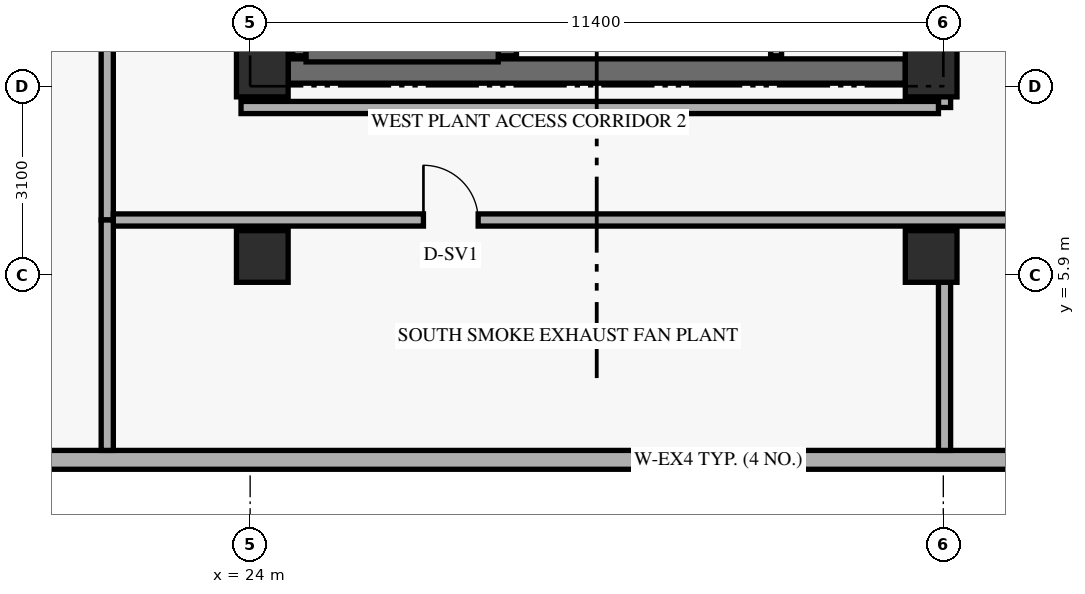
"""IFC4 building model, lengths in metres.
Left out: names, types, materials, properties, quantities, classifications, styles, units other than length and angle.
Written with IfcOpenShell. Run it as: python <this file> out.ifc"""

import sys

from ifc_helpers import new_model, si_unit, direction, frame, frame_2d, origin, origin_2d, place, context, subcontext, project, spatial, rectangle, extrude, element, fill, save


model = new_model("IFC4")
c1 = context("Model", 3, precision=1e-05, world=origin(), true_north=direction((0.0, 1.0)))
c2 = subcontext(c1, "Body", "Model", "MODEL_VIEW")
j1 = project(units=[si_unit("LENGTHUNIT", "METRE"), si_unit("PLANEANGLEUNIT", "RADIAN")], contexts=[c1])
p1 = place(None, origin())
s1 = spatial("IfcSite", under=j1, at=p1, CompositionType="ELEMENT")
p2 = place(p1, origin())
s2 = spatial("IfcBuilding", under=s1, at=p2, CompositionType="ELEMENT")
p3 = place(p2, frame((0.0, 0.0, 135.6)))
s3 = spatial("IfcBuildingStorey", under=s2, at=p3, CompositionType="ELEMENT", Elevation=135.6)
p4 = place(p3, frame((24.625, 9.25, 0.0), z_axis=(0.0, 0.0, 1.0), x_axis=(1.0, 0.0, 0.0)))
e1 = element("IfcWall", 1, at=p4, inside=s3, PredefinedType="SHEAR", context=c2, shape_type="SweptSolid", body=[
    extrude(rectangle(XDim=10.15, YDim=0.4, at=frame_2d((5.075, 0.0))), origin(), (0.0, 0.0, 1.0), 5.16),
])
p5 = place(p3, frame((24.81, 9.5, 0.0), z_axis=(0.0, 0.0, 1.0), x_axis=(0.0, 1.0, 0.0)))
e2 = element("IfcWall", 2, at=p5, inside=s3, PredefinedType="SHEAR", context=c2, shape_type="SweptSolid", body=[
    extrude(rectangle(XDim=7.76, YDim=0.22, at=frame_2d((3.88, 0.0))), origin(), (0.0, 0.0, 1.0), 5.16),
])
p6 = place(p3, frame((28.23, 9.5, 0.0), z_axis=(0.0, 0.0, 1.0), x_axis=(0.0, 1.0, 0.0)))
e3 = element("IfcWall", 3, at=p6, inside=s3, PredefinedType="SHEAR", context=c2, shape_type="SweptSolid", body=[
    extrude(rectangle(XDim=7.76, YDim=0.3, at=frame_2d((3.88, 0.0))), origin(), (0.0, 0.0, 1.0), 5.16),
])
p7 = place(p3, frame((24.92, 9.51, 0.0), z_axis=(0.0, 0.0, 1.0), x_axis=(1.0, 0.0, 0.0)))
e4 = element("IfcWall", 4, at=p7, inside=s3, PredefinedType="SHEAR", context=c2, shape_type="SweptSolid", body=[
    extrude(rectangle(XDim=3.16, YDim=0.22, at=frame_2d((1.58, 0.0))), origin(), (0.0, 0.0, 1.0), 5.16),
])
for number, where, z_axis, x_axis in (
    (5, (24.2, 6.2, 0.0), (0.0, 0.0, 1.0), (1.0, 0.0, 0.0)),
    (6, (24.2, 9.25, 0.0), (0.0, 0.0, 1.0), (1.0, 0.0, 0.0)),
    (7, (35.2, 6.2, 0.0), (0.0, 0.0, 1.0), (1.0, 0.0, 0.0)),
    (8, (35.2, 9.25, 0.0), (0.0, 0.0, 1.0), (1.0, 0.0, 0.0)),
):
    element("IfcColumn", number, at=place(p3, frame(where, z_axis=z_axis, x_axis=x_axis)), inside=s3, PredefinedType="COLUMN", context=c2, shape_type="SweptSolid", body=[
        extrude(rectangle(XDim=0.85, YDim=0.85, at=origin_2d()), origin(), (0.0, 0.0, 1.0), 5.4),
    ])
p8 = place(p3, frame((13.42, 2.855, 0.0), z_axis=(0.0, 0.0, 1.0), x_axis=(1.0, 0.0, 0.0)))
e9 = element("IfcWall", 9, at=p8, inside=s3, PredefinedType="SOLIDWALL", context=c2, shape_type="SweptSolid", body=[
    extrude(rectangle(XDim=36.56, YDim=0.31, at=frame_2d((18.28, 0.0))), origin(), (0.0, 0.0, 1.0), 5.16),
])
p9 = place(p3, frame((32.65, 9.5, 0.0), z_axis=(0.0, 0.0, 1.0), x_axis=(0.0, 1.0, 0.0)))
e10 = element("IfcWall", 10, at=p9, inside=s3, PredefinedType="STANDARD", context=c2, shape_type="SweptSolid", body=[
    extrude(rectangle(XDim=6.08, YDim=0.18, at=frame_2d((3.04, 0.0))), origin(), (0.0, 0.0, 1.0), 5.16),
])
p10 = place(p9, frame((0.63, 0.0, 0.0)))
e11 = element("IfcOpeningElement", 11, at=p10, cuts=e10, PredefinedType="OPENING", context=c2, shape_type="SweptSolid", body=[
    extrude(rectangle(XDim=0.9, YDim=2.1, at=frame_2d((0.45, 1.05))), frame((0.0, 0.1, 0.0), z_axis=(0.0, -1.0, 0.0), x_axis=(1.0, 0.0, 0.0)), (0.0, 0.0, 1.0), 0.2),
])
p11 = place(p9, frame((2.63, 0.0, 0.0)))
e12 = element("IfcOpeningElement", 12, at=p11, cuts=e10, PredefinedType="OPENING", context=c2, shape_type="SweptSolid", body=[
    extrude(rectangle(XDim=0.9, YDim=2.1, at=frame_2d((0.45, 1.05))), frame((0.0, 0.1, 0.0), z_axis=(0.0, -1.0, 0.0), x_axis=(1.0, 0.0, 0.0)), (0.0, 0.0, 1.0), 0.2),
])
p12 = place(p9, frame((4.63, 0.0, 0.0)))
e13 = element("IfcOpeningElement", 13, at=p12, cuts=e10, PredefinedType="OPENING", context=c2, shape_type="SweptSolid", body=[
    extrude(rectangle(XDim=0.9, YDim=2.1, at=frame_2d((0.45, 1.05))), frame((0.0, 0.1, 0.0), z_axis=(0.0, -1.0, 0.0), x_axis=(1.0, 0.0, 0.0)), (0.0, 0.0, 1.0), 0.2),
])
p13 = place(p3, frame((35.42, 3.01, 0.0), z_axis=(0.0, 0.0, 1.0), x_axis=(0.0, 1.0, 0.0)))
e14 = element("IfcWall", 14, at=p13, inside=s3, PredefinedType="STANDARD", context=c2, shape_type="SweptSolid", body=[
    extrude(rectangle(XDim=3.79, YDim=0.2, at=frame_2d((1.895, 0.0))), origin(), (0.0, 0.0, 1.0), 4.531),
])
p14 = place(p3, frame((35.42, 8.65, 0.0), z_axis=(0.0, 0.0, 1.0), x_axis=(0.0, 1.0, 0.0)))
e15 = element("IfcWall", 15, at=p14, inside=s3, PredefinedType="STANDARD", context=c2, shape_type="SweptSolid", body=[
    extrude(rectangle(XDim=0.6, YDim=0.2, at=frame_2d((0.3, 0.0))), origin(), (0.0, 0.0, 1.0), 4.531),
])
p15 = place(p3, frame((21.65, 6.8, 0.0), z_axis=(0.0, 0.0, 1.0), x_axis=(0.0, 1.0, 0.0)))
e16 = element("IfcWall", 16, at=p15, inside=s3, PredefinedType="STANDARD", context=c2, shape_type="SweptSolid", body=[
    extrude(rectangle(XDim=34.4, YDim=0.2, at=frame_2d((17.2, 0.0))), origin(), (0.0, 0.0, 1.0), 4.531),
])
p16 = place(p15, frame((7.0, 0.0, 0.0)))
e17 = element("IfcOpeningElement", 17, at=p16, cuts=e16, PredefinedType="OPENING", context=c2, shape_type="SweptSolid", body=[
    extrude(rectangle(XDim=1.05, YDim=2.15, at=frame_2d((0.525, 1.075))), frame((0.0, 0.11, 0.0), z_axis=(0.0, -1.0, 0.0), x_axis=(1.0, 0.0, 0.0)), (0.0, 0.0, 1.0), 0.22),
])
p17 = place(p15, frame((21.0, 0.0, 0.0)))
e18 = element("IfcOpeningElement", 18, at=p17, cuts=e16, PredefinedType="OPENING", context=c2, shape_type="SweptSolid", body=[
    extrude(rectangle(XDim=1.05, YDim=2.15, at=frame_2d((0.525, 1.075))), frame((0.0, 0.11, 0.0), z_axis=(0.0, -1.0, 0.0), x_axis=(1.0, 0.0, 0.0)), (0.0, 0.0, 1.0), 0.22),
])
p18 = place(p3, frame((21.75, 6.8, 0.0), z_axis=(0.0, 0.0, 1.0), x_axis=(1.0, 0.0, 0.0)))
e19 = element("IfcWall", 19, at=p18, inside=s3, PredefinedType="STANDARD", context=c2, shape_type="SweptSolid", body=[
    extrude(rectangle(XDim=15.6, YDim=0.2, at=frame_2d((7.8, 0.0))), origin(), (0.0, 0.0, 1.0), 4.531),
])
p19 = place(p18, frame((5.1, 0.0, 0.0)))
e20 = element("IfcOpeningElement", 20, at=p19, cuts=e19, PredefinedType="OPENING", context=c2, shape_type="SweptSolid", body=[
    extrude(rectangle(XDim=0.9, YDim=2.1, at=frame_2d((0.45, 1.05))), frame((0.0, 0.11, 0.0), z_axis=(0.0, -1.0, 0.0), x_axis=(1.0, 0.0, 0.0)), (0.0, 0.0, 1.0), 0.22),
])
p20 = place(p3, frame((23.85, 8.65, 0.0), z_axis=(0.0, 0.0, 1.0), x_axis=(1.0, 0.0, 0.0)))
e21 = element("IfcWall", 21, at=p20, inside=s3, PredefinedType="STANDARD", context=c2, shape_type="SweptSolid", body=[
    extrude(rectangle(XDim=11.47, YDim=0.2, at=frame_2d((5.735, 0.0))), origin(), (0.0, 0.0, 1.0), 4.531),
])
p21 = place(p3, frame((21.65, 3.01, 0.0), z_axis=(0.0, 0.0, 1.0), x_axis=(0.0, 1.0, 0.0)))
e22 = element("IfcWall", 22, at=p21, inside=s3, PredefinedType="STANDARD", context=c2, shape_type="SweptSolid", body=[
    extrude(rectangle(XDim=3.79, YDim=0.2, at=frame_2d((1.895, 0.0))), origin(), (0.0, 0.0, 1.0), 4.609),
])
p22 = place(p19, origin())
e23 = element("IfcDoor", 23, at=p22, inside=s3, OperationType="SINGLE_SWING_LEFT", PredefinedType="DOOR", context=c2, shape_type="SweptSolid", body=[
    extrude(rectangle(XDim=0.9, YDim=2.1, at=frame_2d((0.45, 1.05))), frame((0.0, 0.025, 0.0), z_axis=(0.0, -1.0, 0.0), x_axis=(1.0, 0.0, 0.0)), (0.0, 0.0, 1.0), 0.05),
])
fill(e20, e23)
save(model, sys.argv[1])
